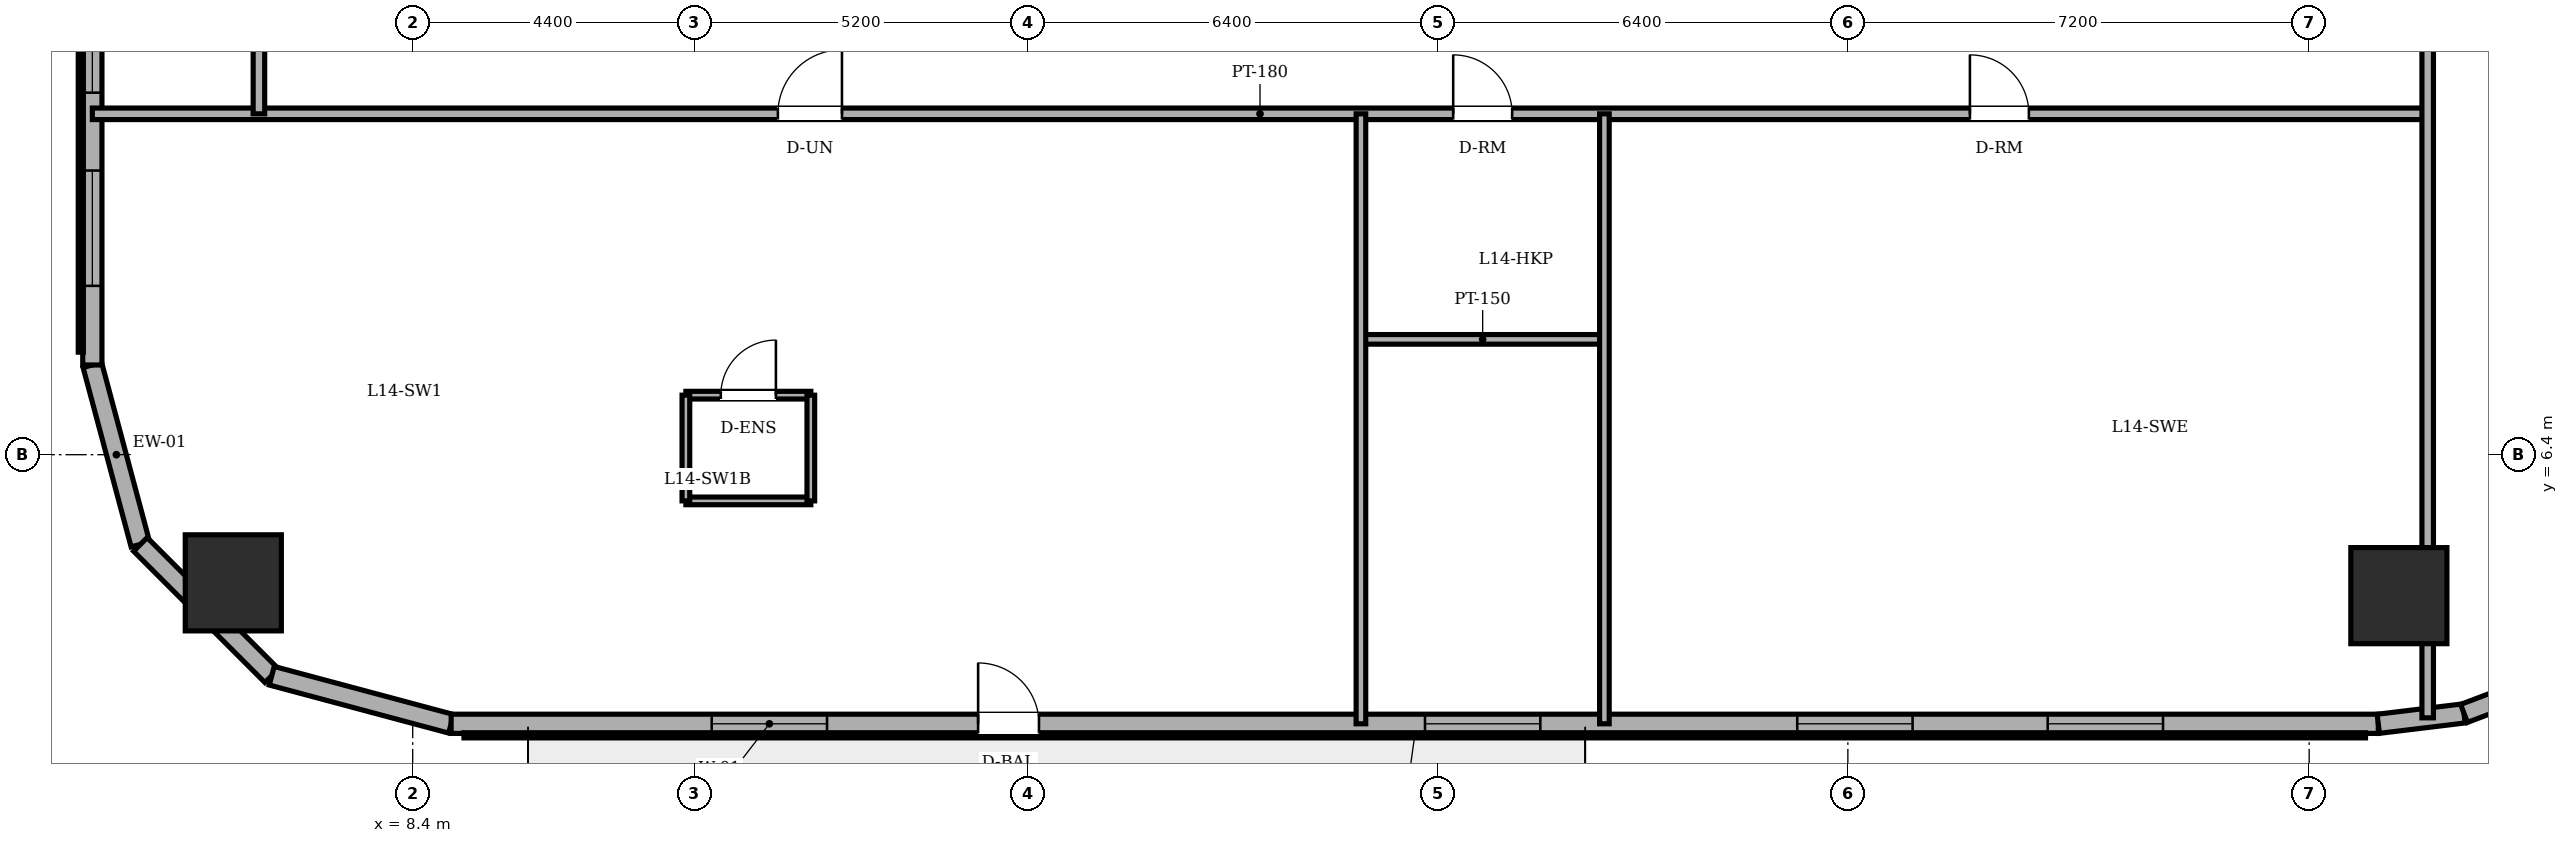
"""IFC4 building model, lengths in metres.
Left out: names, types, materials, properties, quantities, classifications, styles, units other than length and angle.
Written with IfcOpenShell. Run it as: python <this file> out.ifc"""

import sys

from ifc_helpers import new_model, si_unit, direction, frame, frame_2d, origin, origin_2d, place, context, subcontext, project, spatial, rectangle, circle, extrude, element, fill, save


model = new_model("IFC4")
c1 = context("Model", 3, precision=1e-05, world=origin(), true_north=direction((0.0, 1.0)))
c2 = subcontext(c1, "Body", "Model", "MODEL_VIEW")
j1 = project(units=[si_unit("LENGTHUNIT", "METRE"), si_unit("PLANEANGLEUNIT", "RADIAN")], contexts=[c1])
p1 = place(None, origin())
s1 = spatial("IfcSite", under=j1, at=p1, CompositionType="ELEMENT")
p2 = place(p1, origin())
s2 = spatial("IfcBuilding", under=s1, at=p2, CompositionType="ELEMENT")
p3 = place(p2, frame((0.0, 0.0, 54.0)))
s3 = spatial("IfcBuildingStorey", under=s2, at=p3, CompositionType="ELEMENT", Elevation=54.0)
for number, where, z_axis, x_axis in (
    (1, (5.6, 4.4, 0.0), (0.0, 0.0, 1.0), (1.0, 0.0, 0.0)),
    (2, (39.4, 4.2, 0.0), (0.0, 0.0, 1.0), (1.0, 0.0, 0.0)),
):
    element("IfcColumn", number, at=place(p3, frame(where, z_axis=z_axis, x_axis=x_axis)), inside=s3, PredefinedType="COLUMN", context=c2, shape_type="SweptSolid", body=[
        extrude(circle(Radius=0.75, at=origin_2d()), origin(), (0.0, 0.0, 1.0), 3.6),
    ])
p4 = place(p3, frame((3.4, 7.8, 0.0), z_axis=(0.0, 0.0, 1.0), x_axis=(0.258731875344, -0.96594917914, 0.0)))
e3 = element("IfcWall", 3, at=p4, inside=s3, PredefinedType="SOLIDWALL", context=c2, shape_type="SweptSolid", body=[
    extrude(rectangle(XDim=2.899, YDim=0.3, at=frame_2d((1.449, 0.0))), origin(), (0.0, 0.0, 1.0), 3.4),
])
p5 = place(p3, frame((4.15, 5.0, 0.0), z_axis=(0.0, 0.0, 1.0), x_axis=(0.707106781187, -0.707106781187, 0.0)))
e4 = element("IfcWall", 4, at=p5, inside=s3, PredefinedType="SOLIDWALL", context=c2, shape_type="SweptSolid", body=[
    extrude(rectangle(XDim=2.899, YDim=0.3, at=frame_2d((1.45, 0.0))), origin(), (0.0, 0.0, 1.0), 3.4),
])
p6 = place(p3, frame((6.2, 2.95, 0.0), z_axis=(0.0, 0.0, 1.0), x_axis=(0.96594917914, -0.258731875344, 0.0)))
e5 = element("IfcWall", 5, at=p6, inside=s3, PredefinedType="SOLIDWALL", context=c2, shape_type="SweptSolid", body=[
    extrude(rectangle(XDim=2.899, YDim=0.3, at=frame_2d((1.449, 0.0))), origin(), (0.0, 0.0, 1.0), 3.4),
])
p7 = place(p3, frame((9.0, 2.2, 0.0), z_axis=(0.0, 0.0, 1.0), x_axis=(1.0, 0.0, 0.0)))
e6 = element("IfcWall", 6, at=p7, inside=s3, PredefinedType="SOLIDWALL", context=c2, shape_type="SweptSolid", body=[
    extrude(rectangle(XDim=30.079, YDim=0.3, at=frame_2d((15.04, 0.0))), origin(), (0.0, 0.0, 1.0), 3.4),
])
p8 = place(p7, frame((8.225, 0.0, 0.0)))
e7 = element("IfcOpeningElement", 7, at=p8, cuts=e6, PredefinedType="OPENING", context=c2, shape_type="SweptSolid", body=[
    extrude(rectangle(XDim=0.95, YDim=2.2, at=frame_2d((0.475, 1.1))), frame((0.0, 0.16, 0.0), z_axis=(0.0, -1.0, 0.0), x_axis=(1.0, 0.0, 0.0)), (0.0, 0.0, 1.0), 0.32),
])
p9 = place(p7, frame((4.067, 0.0, 0.85)))
e8 = element("IfcOpeningElement", 8, at=p9, cuts=e6, PredefinedType="OPENING", context=c2, shape_type="SweptSolid", body=[
    extrude(rectangle(XDim=1.8, YDim=1.55, at=frame_2d((0.9, 0.775))), frame((0.0, 0.16, 0.0), z_axis=(0.0, -1.0, 0.0), x_axis=(1.0, 0.0, 0.0)), (0.0, 0.0, 1.0), 0.32),
])
p10 = place(p7, frame((15.2, 0.0, 0.85)))
e9 = element("IfcOpeningElement", 9, at=p10, cuts=e6, PredefinedType="OPENING", context=c2, shape_type="SweptSolid", body=[
    extrude(rectangle(XDim=1.8, YDim=1.55, at=frame_2d((0.9, 0.775))), frame((0.0, 0.16, 0.0), z_axis=(0.0, -1.0, 0.0), x_axis=(1.0, 0.0, 0.0)), (0.0, 0.0, 1.0), 0.32),
])
p11 = place(p7, frame((21.01, 0.0, 0.85)))
e10 = element("IfcOpeningElement", 10, at=p11, cuts=e6, PredefinedType="OPENING", context=c2, shape_type="SweptSolid", body=[
    extrude(rectangle(XDim=1.8, YDim=1.55, at=frame_2d((0.9, 0.775))), frame((0.0, 0.16, 0.0), z_axis=(0.0, -1.0, 0.0), x_axis=(1.0, 0.0, 0.0)), (0.0, 0.0, 1.0), 0.32),
])
p12 = place(p7, frame((24.919, 0.0, 0.85)))
e11 = element("IfcOpeningElement", 11, at=p12, cuts=e6, PredefinedType="OPENING", context=c2, shape_type="SweptSolid", body=[
    extrude(rectangle(XDim=1.8, YDim=1.55, at=frame_2d((0.9, 0.775))), frame((0.0, 0.16, 0.0), z_axis=(0.0, -1.0, 0.0), x_axis=(1.0, 0.0, 0.0)), (0.0, 0.0, 1.0), 0.32),
])
p13 = place(p3, frame((39.079, 2.2, 0.0), z_axis=(0.0, 0.0, 1.0), x_axis=(0.992739027259, 0.120288086515, 0.0)))
e12 = element("IfcWall", 12, at=p13, inside=s3, PredefinedType="SOLIDWALL", context=c2, shape_type="SweptSolid", body=[
    extrude(rectangle(XDim=1.348, YDim=0.3, at=frame_2d((0.674, 0.0))), origin(), (0.0, 0.0, 1.0), 3.4),
])
p14 = place(p3, frame((40.417, 2.362, 0.0), z_axis=(0.0, 0.0, 1.0), x_axis=(0.935156721165, 0.354234254216, 0.0)))
e13 = element("IfcWall", 13, at=p14, inside=s3, PredefinedType="SOLIDWALL", context=c2, shape_type="SweptSolid", body=[
    extrude(rectangle(XDim=1.349, YDim=0.3, at=frame_2d((0.675, 0.0))), origin(), (0.0, 0.0, 1.0), 3.4),
])
p15 = place(p3, frame((3.4, 40.2, 0.0), z_axis=(0.0, 0.0, 1.0), x_axis=(0.0, -1.0, 0.0)))
e14 = element("IfcWall", 14, at=p15, inside=s3, PredefinedType="SOLIDWALL", context=c2, shape_type="SweptSolid", body=[
    extrude(rectangle(XDim=32.4, YDim=0.3, at=frame_2d((16.2, 0.0))), origin(), (0.0, 0.0, 1.0), 3.4),
])
p16 = place(p15, frame((1.235, 0.0, 0.85)))
e15 = element("IfcOpeningElement", 15, at=p16, cuts=e14, PredefinedType="OPENING", context=c2, shape_type="SweptSolid", body=[
    extrude(rectangle(XDim=1.8, YDim=1.55, at=frame_2d((0.9, 0.775))), frame((0.0, 0.16, 0.0), z_axis=(0.0, -1.0, 0.0), x_axis=(1.0, 0.0, 0.0)), (0.0, 0.0, 1.0), 0.32),
])
p17 = place(p15, frame((4.25, 0.0, 0.85)))
e16 = element("IfcOpeningElement", 16, at=p17, cuts=e14, PredefinedType="OPENING", context=c2, shape_type="SweptSolid", body=[
    extrude(rectangle(XDim=1.8, YDim=1.55, at=frame_2d((0.9, 0.775))), frame((0.0, 0.16, 0.0), z_axis=(0.0, -1.0, 0.0), x_axis=(1.0, 0.0, 0.0)), (0.0, 0.0, 1.0), 0.32),
])
p18 = place(p15, frame((9.253, 0.0, 0.85)))
e17 = element("IfcOpeningElement", 17, at=p18, cuts=e14, PredefinedType="OPENING", context=c2, shape_type="SweptSolid", body=[
    extrude(rectangle(XDim=1.8, YDim=1.55, at=frame_2d((0.9, 0.775))), frame((0.0, 0.16, 0.0), z_axis=(0.0, -1.0, 0.0), x_axis=(1.0, 0.0, 0.0)), (0.0, 0.0, 1.0), 0.32),
])
p19 = place(p15, frame((13.027, 0.0, 0.85)))
e18 = element("IfcOpeningElement", 18, at=p19, cuts=e14, PredefinedType="OPENING", context=c2, shape_type="SweptSolid", body=[
    extrude(rectangle(XDim=1.8, YDim=1.55, at=frame_2d((0.9, 0.775))), frame((0.0, 0.16, 0.0), z_axis=(0.0, -1.0, 0.0), x_axis=(1.0, 0.0, 0.0)), (0.0, 0.0, 1.0), 0.32),
])
p20 = place(p15, frame((19.573, 0.0, 0.85)))
e19 = element("IfcOpeningElement", 19, at=p20, cuts=e14, PredefinedType="OPENING", context=c2, shape_type="SweptSolid", body=[
    extrude(rectangle(XDim=1.8, YDim=1.55, at=frame_2d((0.9, 0.775))), frame((0.0, 0.16, 0.0), z_axis=(0.0, -1.0, 0.0), x_axis=(1.0, 0.0, 0.0)), (0.0, 0.0, 1.0), 0.32),
])
p21 = place(p15, frame((22.347, 0.0, 0.85)))
e20 = element("IfcOpeningElement", 20, at=p21, cuts=e14, PredefinedType="OPENING", context=c2, shape_type="SweptSolid", body=[
    extrude(rectangle(XDim=1.8, YDim=1.55, at=frame_2d((0.9, 0.775))), frame((0.0, 0.16, 0.0), z_axis=(0.0, -1.0, 0.0), x_axis=(1.0, 0.0, 0.0)), (0.0, 0.0, 1.0), 0.32),
])
p22 = place(p15, frame((26.35, 0.0, 0.85)))
e21 = element("IfcOpeningElement", 21, at=p22, cuts=e14, PredefinedType="OPENING", context=c2, shape_type="SweptSolid", body=[
    extrude(rectangle(XDim=1.8, YDim=1.55, at=frame_2d((0.9, 0.775))), frame((0.0, 0.16, 0.0), z_axis=(0.0, -1.0, 0.0), x_axis=(1.0, 0.0, 0.0)), (0.0, 0.0, 1.0), 0.32),
])
p23 = place(p15, frame((29.365, 0.0, 0.85)))
e22 = element("IfcOpeningElement", 22, at=p23, cuts=e14, PredefinedType="OPENING", context=c2, shape_type="SweptSolid", body=[
    extrude(rectangle(XDim=1.8, YDim=1.55, at=frame_2d((0.9, 0.775))), frame((0.0, 0.16, 0.0), z_axis=(0.0, -1.0, 0.0), x_axis=(1.0, 0.0, 0.0)), (0.0, 0.0, 1.0), 0.32),
])
p24 = place(p3, frame((12.664, 7.329, 0.0), z_axis=(0.0, 0.0, 1.0), x_axis=(1.0, 0.0, 0.0)))
e23 = element("IfcWall", 23, at=p24, inside=s3, PredefinedType="PARTITIONING", context=c2, shape_type="SweptSolid", body=[
    extrude(rectangle(XDim=1.95, YDim=0.12, at=frame_2d((0.975, 0.0))), origin(), (0.0, 0.0, 1.0), 3.4),
])
p25 = place(p24, frame((0.545, 0.0, 0.0)))
e24 = element("IfcOpeningElement", 24, at=p25, cuts=e23, PredefinedType="OPENING", context=c2, shape_type="SweptSolid", body=[
    extrude(rectangle(XDim=0.86, YDim=2.1, at=frame_2d((0.43, 1.05))), frame((0.0, 0.07, 0.0), z_axis=(0.0, -1.0, 0.0), x_axis=(1.0, 0.0, 0.0)), (0.0, 0.0, 1.0), 0.14),
])
p26 = place(p3, frame((14.614, 5.679, 0.0), z_axis=(0.0, 0.0, 1.0), x_axis=(-1.0, 0.0, 0.0)))
e25 = element("IfcWall", 25, at=p26, inside=s3, PredefinedType="PARTITIONING", context=c2, shape_type="SweptSolid", body=[
    extrude(rectangle(XDim=1.95, YDim=0.12, at=frame_2d((0.975, 0.0))), origin(), (0.0, 0.0, 1.0), 3.4),
])
for number, where, z_axis, x_axis in (
    (26, (12.664, 7.329, 0.0), (0.0, 0.0, 1.0), (0.0, -1.0, 0.0)),
    (27, (14.614, 5.679, 0.0), (0.0, 0.0, 1.0), (0.0, 1.0, 0.0)),
):
    element("IfcWall", number, at=place(p3, frame(where, z_axis=z_axis, x_axis=x_axis)), inside=s3, PredefinedType="PARTITIONING", context=c2, shape_type="SweptSolid", body=[
        extrude(rectangle(XDim=1.65, YDim=0.12, at=frame_2d((0.825, 0.0))), origin(), (0.0, 0.0, 1.0), 3.4),
    ])
p27 = place(p3, frame((23.2, 8.2, 0.0), z_axis=(0.0, 0.0, 1.0), x_axis=(1.0, 0.0, 0.0)))
e28 = element("IfcWall", 28, at=p27, inside=s3, PredefinedType="PARTITIONING", context=c2, shape_type="SweptSolid", body=[
    extrude(rectangle(XDim=3.8, YDim=0.15, at=frame_2d((1.9, 0.0))), origin(), (0.0, 0.0, 1.0), 3.4),
])
p28 = place(p3, frame((3.4, 11.72, 0.0), z_axis=(0.0, 0.0, 1.0), x_axis=(1.0, 0.0, 0.0)))
e29 = element("IfcWall", 29, at=p28, inside=s3, PredefinedType="PARTITIONING", context=c2, shape_type="SweptSolid", body=[
    extrude(rectangle(XDim=36.45, YDim=0.18, at=frame_2d((18.225, 0.0))), origin(), (0.0, 0.0, 1.0), 3.4),
])
p29 = place(p28, frame((21.24, 0.0, 0.0)))
e30 = element("IfcOpeningElement", 30, at=p29, cuts=e29, PredefinedType="OPENING", context=c2, shape_type="SweptSolid", body=[
    extrude(rectangle(XDim=0.92, YDim=2.1, at=frame_2d((0.46, 1.05))), frame((0.0, 0.1, 0.0), z_axis=(0.0, -1.0, 0.0), x_axis=(1.0, 0.0, 0.0)), (0.0, 0.0, 1.0), 0.2),
])
p30 = place(p28, frame((10.7, 0.0, 0.0)))
e31 = element("IfcOpeningElement", 31, at=p30, cuts=e29, PredefinedType="OPENING", context=c2, shape_type="SweptSolid", body=[
    extrude(rectangle(XDim=1.0, YDim=2.15, at=frame_2d((0.5, 1.075))), frame((0.0, 0.1, 0.0), z_axis=(0.0, -1.0, 0.0), x_axis=(1.0, 0.0, 0.0)), (0.0, 0.0, 1.0), 0.2),
])
p31 = place(p28, frame((29.305, 0.0, 0.0)))
e32 = element("IfcOpeningElement", 32, at=p31, cuts=e29, PredefinedType="OPENING", context=c2, shape_type="SweptSolid", body=[
    extrude(rectangle(XDim=0.92, YDim=2.1, at=frame_2d((0.46, 1.05))), frame((0.0, 0.1, 0.0), z_axis=(0.0, -1.0, 0.0), x_axis=(1.0, 0.0, 0.0)), (0.0, 0.0, 1.0), 0.2),
])
p32 = place(p3, frame((6.0, 11.72, 0.0), z_axis=(0.0, 0.0, 1.0), x_axis=(0.0, 1.0, 0.0)))
e33 = element("IfcWall", 33, at=p32, inside=s3, PredefinedType="PARTITIONING", context=c2, shape_type="SweptSolid", body=[
    extrude(rectangle(XDim=2.46, YDim=0.18, at=frame_2d((1.23, 0.0))), origin(), (0.0, 0.0, 1.0), 3.4),
])
for number, where, z_axis, x_axis in (
    (34, (23.2, 2.2, 0.0), (0.0, 0.0, 1.0), (0.0, 1.0, 0.0)),
    (35, (27.0, 2.2, 0.0), (0.0, 0.0, 1.0), (0.0, 1.0, 0.0)),
):
    element("IfcWall", number, at=place(p3, frame(where, z_axis=z_axis, x_axis=x_axis)), inside=s3, PredefinedType="PARTITIONING", context=c2, shape_type="SweptSolid", body=[
        extrude(rectangle(XDim=9.52, YDim=0.15, at=frame_2d((4.76, 0.0))), origin(), (0.0, 0.0, 1.0), 3.4),
    ])
p33 = place(p3, frame((39.85, 2.293, 0.0), z_axis=(0.0, 0.0, 1.0), x_axis=(0.0, 1.0, 0.0)))
e36 = element("IfcWall", 36, at=p33, inside=s3, PredefinedType="PARTITIONING", context=c2, shape_type="SweptSolid", body=[
    extrude(rectangle(XDim=20.527, YDim=0.18, at=frame_2d((10.264, 0.0))), origin(), (0.0, 0.0, 1.0), 2.782),
])
p34 = place(p33, frame((14.257, 0.0, 0.0)))
e37 = element("IfcOpeningElement", 37, at=p34, cuts=e36, PredefinedType="OPENING", context=c2, shape_type="SweptSolid", body=[
    extrude(rectangle(XDim=0.92, YDim=2.1, at=frame_2d((0.46, 1.05))), frame((0.0, 0.1, 0.0), z_axis=(0.0, -1.0, 0.0), x_axis=(1.0, 0.0, 0.0)), (0.0, 0.0, 1.0), 0.2),
])
p35 = place(p8, origin())
e38 = element("IfcDoor", 38, at=p35, inside=s3, OperationType="SINGLE_SWING_LEFT", PredefinedType="DOOR", context=c2, shape_type="SweptSolid", body=[
    extrude(rectangle(XDim=0.95, YDim=2.2, at=frame_2d((0.475, 1.1))), frame((0.0, 0.025, 0.0), z_axis=(0.0, -1.0, 0.0), x_axis=(1.0, 0.0, 0.0)), (0.0, 0.0, 1.0), 0.05),
])
fill(e7, e38)
p36 = place(p9, origin())
e39 = element("IfcWindow", 39, at=p36, inside=s3, PartitioningType="DOUBLE_PANEL_VERTICAL", PredefinedType="WINDOW", context=c2, shape_type="SweptSolid", body=[
    extrude(rectangle(XDim=1.8, YDim=1.55, at=frame_2d((0.9, 0.775))), frame((0.0, 0.03, 0.0), z_axis=(0.0, -1.0, 0.0), x_axis=(1.0, 0.0, 0.0)), (0.0, 0.0, 1.0), 0.06),
])
fill(e8, e39)
p37 = place(p10, origin())
e40 = element("IfcWindow", 40, at=p37, inside=s3, PartitioningType="DOUBLE_PANEL_VERTICAL", PredefinedType="WINDOW", context=c2, shape_type="SweptSolid", body=[
    extrude(rectangle(XDim=1.8, YDim=1.55, at=frame_2d((0.9, 0.775))), frame((0.0, 0.03, 0.0), z_axis=(0.0, -1.0, 0.0), x_axis=(1.0, 0.0, 0.0)), (0.0, 0.0, 1.0), 0.06),
])
fill(e9, e40)
p38 = place(p11, origin())
e41 = element("IfcWindow", 41, at=p38, inside=s3, PartitioningType="DOUBLE_PANEL_VERTICAL", PredefinedType="WINDOW", context=c2, shape_type="SweptSolid", body=[
    extrude(rectangle(XDim=1.8, YDim=1.55, at=frame_2d((0.9, 0.775))), frame((0.0, 0.03, 0.0), z_axis=(0.0, -1.0, 0.0), x_axis=(1.0, 0.0, 0.0)), (0.0, 0.0, 1.0), 0.06),
])
fill(e10, e41)
p39 = place(p12, origin())
e42 = element("IfcWindow", 42, at=p39, inside=s3, PartitioningType="DOUBLE_PANEL_VERTICAL", PredefinedType="WINDOW", context=c2, shape_type="SweptSolid", body=[
    extrude(rectangle(XDim=1.8, YDim=1.55, at=frame_2d((0.9, 0.775))), frame((0.0, 0.03, 0.0), z_axis=(0.0, -1.0, 0.0), x_axis=(1.0, 0.0, 0.0)), (0.0, 0.0, 1.0), 0.06),
])
fill(e11, e42)
p40 = place(p22, origin())
e43 = element("IfcWindow", 43, at=p40, inside=s3, PartitioningType="DOUBLE_PANEL_VERTICAL", PredefinedType="WINDOW", context=c2, shape_type="SweptSolid", body=[
    extrude(rectangle(XDim=1.8, YDim=1.55, at=frame_2d((0.9, 0.775))), frame((0.0, 0.03, 0.0), z_axis=(0.0, -1.0, 0.0), x_axis=(1.0, 0.0, 0.0)), (0.0, 0.0, 1.0), 0.06),
])
fill(e21, e43)
p41 = place(p23, origin())
e44 = element("IfcWindow", 44, at=p41, inside=s3, PartitioningType="DOUBLE_PANEL_VERTICAL", PredefinedType="WINDOW", context=c2, shape_type="SweptSolid", body=[
    extrude(rectangle(XDim=1.8, YDim=1.55, at=frame_2d((0.9, 0.775))), frame((0.0, 0.03, 0.0), z_axis=(0.0, -1.0, 0.0), x_axis=(1.0, 0.0, 0.0)), (0.0, 0.0, 1.0), 0.06),
])
fill(e22, e44)
p42 = place(p25, origin())
e45 = element("IfcDoor", 45, at=p42, inside=s3, OperationType="SINGLE_SWING_RIGHT", PredefinedType="DOOR", context=c2, shape_type="SweptSolid", body=[
    extrude(rectangle(XDim=0.86, YDim=2.1, at=frame_2d((0.43, 1.05))), frame((0.0, 0.025, 0.0), z_axis=(0.0, -1.0, 0.0), x_axis=(1.0, 0.0, 0.0)), (0.0, 0.0, 1.0), 0.05),
])
fill(e24, e45)
p43 = place(p29, origin())
e46 = element("IfcDoor", 46, at=p43, inside=s3, OperationType="SINGLE_SWING_LEFT", PredefinedType="DOOR", context=c2, shape_type="SweptSolid", body=[
    extrude(rectangle(XDim=0.92, YDim=2.1, at=frame_2d((0.46, 1.05))), frame((0.0, 0.025, 0.0), z_axis=(0.0, -1.0, 0.0), x_axis=(1.0, 0.0, 0.0)), (0.0, 0.0, 1.0), 0.05),
])
fill(e30, e46)
p44 = place(p30, origin())
e47 = element("IfcDoor", 47, at=p44, inside=s3, OperationType="SINGLE_SWING_RIGHT", PredefinedType="DOOR", context=c2, shape_type="SweptSolid", body=[
    extrude(rectangle(XDim=1.0, YDim=2.15, at=frame_2d((0.5, 1.075))), frame((0.0, 0.025, 0.0), z_axis=(0.0, -1.0, 0.0), x_axis=(1.0, 0.0, 0.0)), (0.0, 0.0, 1.0), 0.05),
])
fill(e31, e47)
p45 = place(p31, origin())
e48 = element("IfcDoor", 48, at=p45, inside=s3, OperationType="SINGLE_SWING_LEFT", PredefinedType="DOOR", context=c2, shape_type="SweptSolid", body=[
    extrude(rectangle(XDim=0.92, YDim=2.1, at=frame_2d((0.46, 1.05))), frame((0.0, 0.025, 0.0), z_axis=(0.0, -1.0, 0.0), x_axis=(1.0, 0.0, 0.0)), (0.0, 0.0, 1.0), 0.05),
])
fill(e32, e48)
save(model, sys.argv[1])
